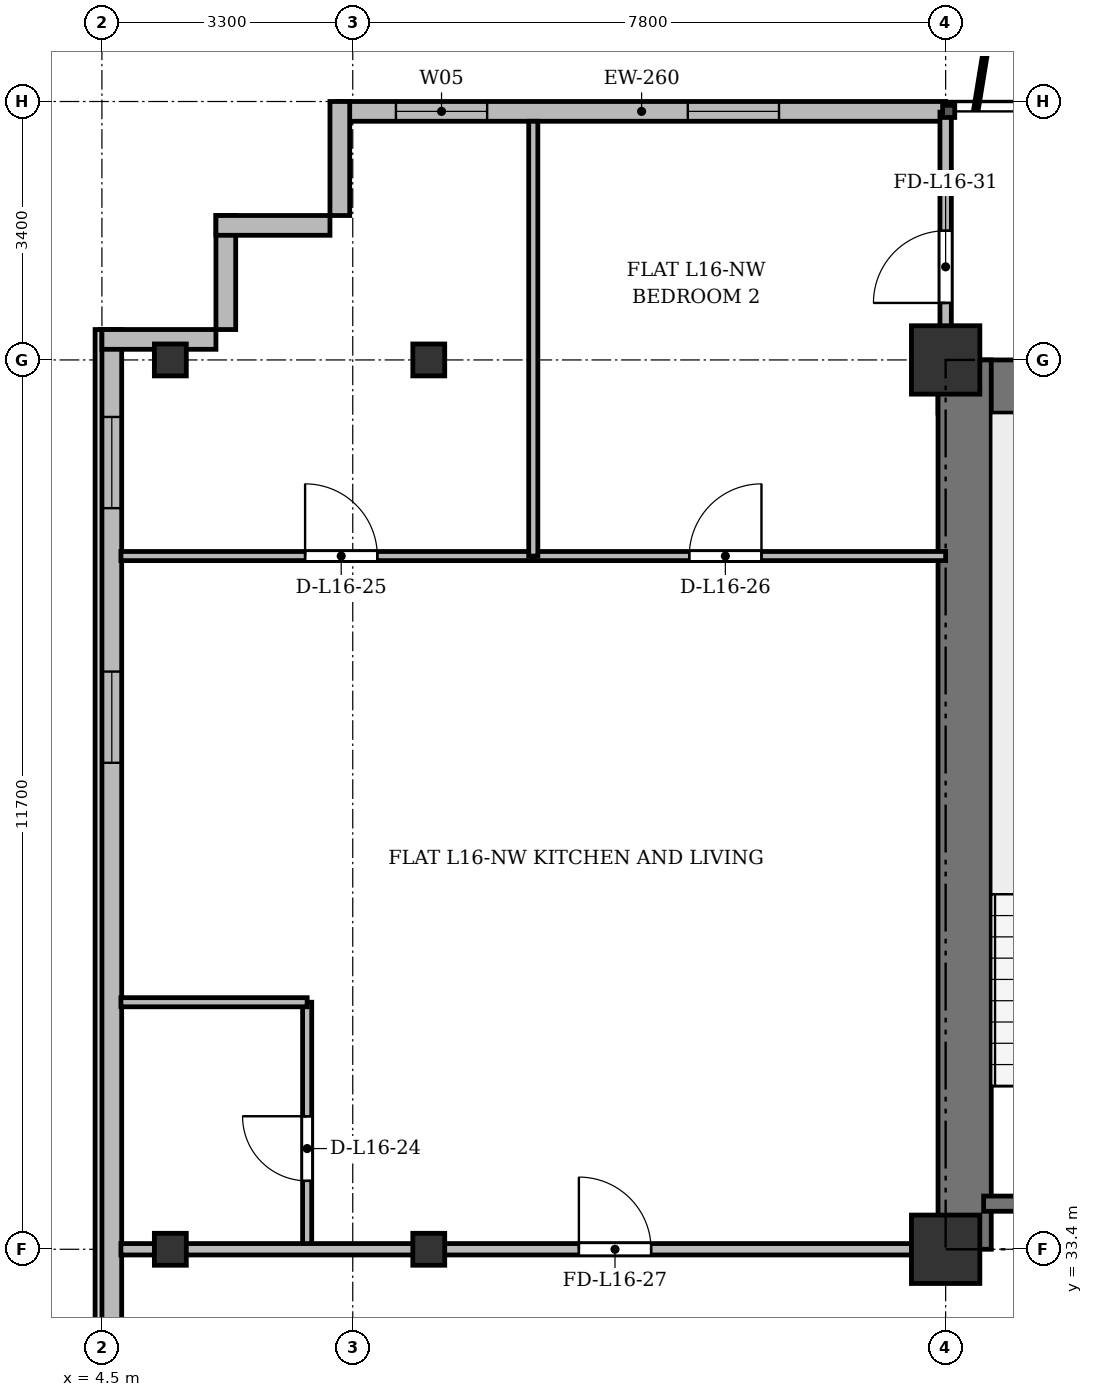
"""IFC4 building model, lengths in metres.
Left out: names, types, materials, properties, quantities, classifications, styles, units other than length and angle.
Written with IfcOpenShell. Run it as: python <this file> out.ifc"""

import sys

from ifc_helpers import new_model, si_unit, direction, frame, frame_2d, origin, origin_2d, place, context, subcontext, project, spatial, rectangle, i_section, extrude, source, transform, mapped, element, fill, save


model = new_model("IFC4")
c1 = context("Model", 3, precision=1e-05, world=origin(), true_north=direction((0.0, 1.0)))
c2 = subcontext(c1, "Body", "Model", "MODEL_VIEW")
j1 = project(units=[si_unit("LENGTHUNIT", "METRE"), si_unit("PLANEANGLEUNIT", "RADIAN")], contexts=[c1])
p1 = place(None, origin())
s1 = spatial("IfcSite", under=j1, at=p1, CompositionType="ELEMENT")
p2 = place(p1, origin())
s2 = spatial("IfcBuilding", under=s1, at=p2, CompositionType="ELEMENT")
p3 = place(p2, frame((0.0, 0.0, 63.1)))
s3 = spatial("IfcBuildingStorey", under=s2, at=p3, CompositionType="ELEMENT", Elevation=63.1)
m1 = source(origin(), c2, "Body", "SweptSolid", [
    extrude(i_section(OverallWidth=0.42, OverallDepth=0.42, WebThickness=0.026, FlangeThickness=0.04, at=origin_2d()), origin(), (0.0, 0.0, 1.0), 3.6),
])
for number, where, z_axis, x_axis in (
    (1, (5.4, 33.4, 0.0), (0.0, 0.0, 1.0), (1.0, 0.0, 0.0)),
    (2, (5.4, 45.1, 0.0), (0.0, 0.0, 1.0), (1.0, 0.0, 0.0)),
    (3, (8.8, 33.4, 0.0), (0.0, 0.0, 1.0), (1.0, 0.0, 0.0)),
    (4, (8.8, 45.1, 0.0), (0.0, 0.0, 1.0), (1.0, 0.0, 0.0)),
):
    element("IfcColumn", number, at=place(p3, frame(where, z_axis=z_axis, x_axis=x_axis)), inside=s3, PredefinedType="COLUMN", context=c2, shape_type="MappedRepresentation", body=[
        mapped(m1, transform((0.0, 0.0, 0.0), x_axis=(1.0, 0.0, 0.0), y_axis=(0.0, 1.0, 0.0), z_axis=(0.0, 0.0, 1.0), scale=1.0)),
    ])
m2 = source(origin(), c2, "Body", "SweptSolid", [
    extrude(rectangle(XDim=0.9, YDim=0.9, at=origin_2d()), origin(), (0.0, 0.0, 1.0), 3.6),
])
for number, where, z_axis, x_axis in (
    (5, (15.6, 33.4, 0.0), (0.0, 0.0, 1.0), (1.0, 0.0, 0.0)),
    (6, (15.6, 45.1, 0.0), (0.0, 0.0, 1.0), (1.0, 0.0, 0.0)),
):
    element("IfcColumn", number, at=place(p3, frame(where, z_axis=z_axis, x_axis=x_axis)), inside=s3, PredefinedType="COLUMN", context=c2, shape_type="MappedRepresentation", body=[
        mapped(m2, transform((0.0, 0.0, 0.0), x_axis=(1.0, 0.0, 0.0), y_axis=(0.0, 1.0, 0.0), z_axis=(0.0, 0.0, 1.0), scale=1.0)),
    ])
p4 = place(p3, frame((7.6, 48.37, 0.0), z_axis=(0.0, 0.0, 1.0), x_axis=(1.0, 0.0, 0.0)))
e7 = element("IfcWall", 7, at=p4, inside=s3, PredefinedType="SOLIDWALL", context=c2, shape_type="SweptSolid", body=[
    extrude(rectangle(XDim=8.0, YDim=0.26, at=frame_2d((4.0, 0.0))), origin(), (0.0, 0.0, 1.0), 3.34),
])
p5 = place(p4, frame((0.768, 0.0, 0.9)))
e8 = element("IfcOpeningElement", 8, at=p5, cuts=e7, PredefinedType="OPENING", context=c2, shape_type="SweptSolid", body=[
    extrude(rectangle(XDim=1.2, YDim=1.65, at=frame_2d((0.6, 0.825))), frame((0.0, 0.14, 0.0), z_axis=(0.0, -1.0, 0.0), x_axis=(1.0, 0.0, 0.0)), (0.0, 0.0, 1.0), 0.28),
])
p6 = place(p4, frame((4.608, 0.0, 0.9)))
e9 = element("IfcOpeningElement", 9, at=p6, cuts=e7, PredefinedType="OPENING", context=c2, shape_type="SweptSolid", body=[
    extrude(rectangle(XDim=1.2, YDim=1.65, at=frame_2d((0.6, 0.825))), frame((0.0, 0.14, 0.0), z_axis=(0.0, -1.0, 0.0), x_axis=(1.0, 0.0, 0.0)), (0.0, 0.0, 1.0), 0.28),
])
p7 = place(p3, frame((4.63, 5.9, 0.0), z_axis=(0.0, 0.0, 1.0), x_axis=(0.0, 1.0, 0.0)))
e10 = element("IfcWall", 10, at=p7, inside=s3, PredefinedType="SOLIDWALL", context=c2, shape_type="SweptSolid", body=[
    extrude(rectangle(XDim=39.6, YDim=0.26, at=frame_2d((19.8, 0.0))), origin(), (0.0, 0.0, 1.0), 3.34),
])
p8 = place(p7, frame((1.45, 0.0, 0.92)))
e11 = element("IfcOpeningElement", 11, at=p8, cuts=e10, PredefinedType="OPENING", context=c2, shape_type="SweptSolid", body=[
    extrude(rectangle(XDim=1.2, YDim=1.65, at=frame_2d((0.6, 0.825))), frame((0.0, 0.14, 0.0), z_axis=(0.0, -1.0, 0.0), x_axis=(1.0, 0.0, 0.0)), (0.0, 0.0, 1.0), 0.28),
])
p9 = place(p7, frame((4.2, 0.0, 0.92)))
e12 = element("IfcOpeningElement", 12, at=p9, cuts=e10, PredefinedType="OPENING", context=c2, shape_type="SweptSolid", body=[
    extrude(rectangle(XDim=2.6, YDim=1.9, at=frame_2d((1.3, 0.95))), frame((0.0, 0.14, 0.0), z_axis=(0.0, -1.0, 0.0), x_axis=(1.0, 0.0, 0.0)), (0.0, 0.0, 1.0), 0.28),
])
p10 = place(p7, frame((8.4, 0.0, 0.92)))
e13 = element("IfcOpeningElement", 13, at=p10, cuts=e10, PredefinedType="OPENING", context=c2, shape_type="SweptSolid", body=[
    extrude(rectangle(XDim=2.6, YDim=1.9, at=frame_2d((1.3, 0.95))), frame((0.0, 0.14, 0.0), z_axis=(0.0, -1.0, 0.0), x_axis=(1.0, 0.0, 0.0)), (0.0, 0.0, 1.0), 0.28),
])
p11 = place(p7, frame((33.9, 0.0, 0.92)))
e14 = element("IfcOpeningElement", 14, at=p11, cuts=e10, PredefinedType="OPENING", context=c2, shape_type="SweptSolid", body=[
    extrude(rectangle(XDim=1.2, YDim=1.65, at=frame_2d((0.6, 0.825))), frame((0.0, 0.14, 0.0), z_axis=(0.0, -1.0, 0.0), x_axis=(1.0, 0.0, 0.0)), (0.0, 0.0, 1.0), 0.28),
])
p12 = place(p7, frame((37.25, 0.0, 0.92)))
e15 = element("IfcOpeningElement", 15, at=p12, cuts=e10, PredefinedType="OPENING", context=c2, shape_type="SweptSolid", body=[
    extrude(rectangle(XDim=1.2, YDim=1.65, at=frame_2d((0.6, 0.825))), frame((0.0, 0.14, 0.0), z_axis=(0.0, -1.0, 0.0), x_axis=(1.0, 0.0, 0.0)), (0.0, 0.0, 1.0), 0.28),
])
p13 = place(p3, frame((4.5, 45.37, 0.0), z_axis=(0.0, 0.0, 1.0), x_axis=(1.0, 0.0, 0.0)))
e16 = element("IfcWall", 16, at=p13, inside=s3, PredefinedType="SOLIDWALL", context=c2, shape_type="SweptSolid", body=[
    extrude(rectangle(XDim=1.5, YDim=0.26, at=frame_2d((0.75, 0.0))), origin(), (0.0, 0.0, 1.0), 2.69),
])
for number, where, z_axis, x_axis in (
    (17, (6.13, 45.5, 0.0), (0.0, 0.0, 1.0), (0.0, 1.0, 0.0)),
    (18, (6.0, 46.87, 0.0), (0.0, 0.0, 1.0), (1.0, 0.0, 0.0)),
    (19, (7.63, 47.0, 0.0), (0.0, 0.0, 1.0), (0.0, 1.0, 0.0)),
):
    element("IfcWall", number, at=place(p3, frame(where, z_axis=z_axis, x_axis=x_axis)), inside=s3, PredefinedType="SOLIDWALL", context=c2, shape_type="SweptSolid", body=[
        extrude(rectangle(XDim=1.5, YDim=0.26, at=frame_2d((0.75, 0.0))), origin(), (0.0, 0.0, 1.0), 3.34),
    ])
p14 = place(p3, frame((15.5, 44.75, 0.0), z_axis=(0.0, 0.0, 1.0), x_axis=(1.0, 0.0, 0.0)))
e20 = element("IfcWall", 20, at=p14, inside=s3, PredefinedType="SHEAR", context=c2, shape_type="SweptSolid", body=[
    extrude(rectangle(XDim=43.4, YDim=0.7, at=frame_2d((21.7, 0.0))), origin(), (0.0, 0.0, 1.0), 3.34),
])
p15 = place(p3, frame((15.85, 33.4, 0.0), z_axis=(0.0, 0.0, 1.0), x_axis=(0.0, 1.0, 0.0)))
e21 = element("IfcWall", 21, at=p15, inside=s3, PredefinedType="SHEAR", context=c2, shape_type="SweptSolid", body=[
    extrude(rectangle(XDim=11.7, YDim=0.7, at=frame_2d((5.85, 0.0))), origin(), (0.0, 0.0, 1.0), 3.34),
])
p16 = place(p3, frame((16.1, 34.0, 0.0), z_axis=(0.0, 0.0, 1.0), x_axis=(1.0, 0.0, 0.0)))
e22 = element("IfcWall", 22, at=p16, inside=s3, PredefinedType="SHEAR", context=c2, shape_type="SweptSolid", body=[
    extrude(rectangle(XDim=3.4, YDim=0.2, at=frame_2d((1.7, 0.0))), origin(), (0.0, 0.0, 1.0), 3.34),
])
p17 = place(p3, frame((7.2, 33.4, 0.0), z_axis=(0.0, 0.0, 1.0), x_axis=(0.0, 1.0, 0.0)))
e23 = element("IfcWall", 23, at=p17, inside=s3, PredefinedType="PARTITIONING", context=c2, shape_type="SweptSolid", body=[
    extrude(rectangle(XDim=3.25, YDim=0.12, at=frame_2d((1.625, 0.0))), origin(), (0.0, 0.0, 1.0), 2.69),
])
p18 = place(p17, frame((0.9, 0.0, 0.0)))
e24 = element("IfcOpeningElement", 24, at=p18, cuts=e23, PredefinedType="OPENING", context=c2, shape_type="SweptSolid", body=[
    extrude(rectangle(XDim=0.85, YDim=2.1, at=frame_2d((0.425, 1.05))), frame((0.0, 0.07, 0.0), z_axis=(0.0, -1.0, 0.0), x_axis=(1.0, 0.0, 0.0)), (0.0, 0.0, 1.0), 0.14),
])
p19 = place(p3, frame((4.75, 36.65, 0.0), z_axis=(0.0, 0.0, 1.0), x_axis=(1.0, 0.0, 0.0)))
e25 = element("IfcWall", 25, at=p19, inside=s3, PredefinedType="PARTITIONING", context=c2, shape_type="SweptSolid", body=[
    extrude(rectangle(XDim=2.45, YDim=0.12, at=frame_2d((1.225, 0.0))), origin(), (0.0, 0.0, 1.0), 2.752),
])
p20 = place(p3, frame((4.75, 42.52, 0.0), z_axis=(0.0, 0.0, 1.0), x_axis=(1.0, 0.0, 0.0)))
e26 = element("IfcWall", 26, at=p20, inside=s3, PredefinedType="PARTITIONING", context=c2, shape_type="SweptSolid", body=[
    extrude(rectangle(XDim=5.425, YDim=0.12, at=frame_2d((2.712, 0.0))), origin(), (0.0, 0.0, 1.0), 2.752),
])
p21 = place(p20, frame((2.423, 0.0, 0.0)))
e27 = element("IfcOpeningElement", 27, at=p21, cuts=e26, PredefinedType="OPENING", context=c2, shape_type="SweptSolid", body=[
    extrude(rectangle(XDim=0.95, YDim=2.15, at=frame_2d((0.475, 1.075))), frame((0.0, 0.07, 0.0), z_axis=(0.0, -1.0, 0.0), x_axis=(1.0, 0.0, 0.0)), (0.0, 0.0, 1.0), 0.14),
])
p22 = place(p3, frame((10.175, 42.52, 0.0), z_axis=(0.0, 0.0, 1.0), x_axis=(1.0, 0.0, 0.0)))
e28 = element("IfcWall", 28, at=p22, inside=s3, PredefinedType="PARTITIONING", context=c2, shape_type="SweptSolid", body=[
    extrude(rectangle(XDim=5.425, YDim=0.12, at=frame_2d((2.712, 0.0))), origin(), (0.0, 0.0, 1.0), 2.752),
])
p23 = place(p22, frame((2.052, 0.0, 0.0)))
e29 = element("IfcOpeningElement", 29, at=p23, cuts=e28, PredefinedType="OPENING", context=c2, shape_type="SweptSolid", body=[
    extrude(rectangle(XDim=0.95, YDim=2.15, at=frame_2d((0.475, 1.075))), frame((0.0, 0.07, 0.0), z_axis=(0.0, -1.0, 0.0), x_axis=(1.0, 0.0, 0.0)), (0.0, 0.0, 1.0), 0.14),
])
p24 = place(p3, frame((10.175, 42.52, 0.0), z_axis=(0.0, 0.0, 1.0), x_axis=(0.0, 1.0, 0.0)))
e30 = element("IfcWall", 30, at=p24, inside=s3, PredefinedType="PARTITIONING", context=c2, shape_type="SweptSolid", body=[
    extrude(rectangle(XDim=5.72, YDim=0.12, at=frame_2d((2.86, 0.0))), origin(), (0.0, 0.0, 1.0), 2.69),
])
p25 = place(p3, frame((4.75, 33.4, 0.0), z_axis=(0.0, 0.0, 1.0), x_axis=(1.0, 0.0, 0.0)))
e31 = element("IfcWall", 31, at=p25, inside=s3, PredefinedType="PARTITIONING", context=c2, shape_type="SweptSolid", body=[
    extrude(rectangle(XDim=10.85, YDim=0.15, at=frame_2d((5.425, 0.0))), origin(), (0.0, 0.0, 1.0), 2.69),
])
p26 = place(p25, frame((6.025, 0.0, 0.0)))
e32 = element("IfcOpeningElement", 32, at=p26, cuts=e31, PredefinedType="OPENING", context=c2, shape_type="SweptSolid", body=[
    extrude(rectangle(XDim=0.95, YDim=2.15, at=frame_2d((0.475, 1.075))), frame((0.0, 0.085, 0.0), z_axis=(0.0, -1.0, 0.0), x_axis=(1.0, 0.0, 0.0)), (0.0, 0.0, 1.0), 0.17),
])
p27 = place(p3, frame((15.6, 44.75, 0.0), z_axis=(0.0, 0.0, 1.0), x_axis=(0.0, 1.0, 0.0)))
e33 = element("IfcWall", 33, at=p27, inside=s3, PredefinedType="PARTITIONING", context=c2, shape_type="SweptSolid", body=[
    extrude(rectangle(XDim=3.61, YDim=0.15, at=frame_2d((1.805, 0.0))), origin(), (0.0, 0.0, 1.0), 2.752),
])
p28 = place(p27, frame((1.1, 0.0, 0.0)))
e34 = element("IfcOpeningElement", 34, at=p28, cuts=e33, PredefinedType="OPENING", context=c2, shape_type="SweptSolid", body=[
    extrude(rectangle(XDim=0.95, YDim=2.15, at=frame_2d((0.475, 1.075))), frame((0.0, 0.085, 0.0), z_axis=(0.0, -1.0, 0.0), x_axis=(1.0, 0.0, 0.0)), (0.0, 0.0, 1.0), 0.17),
])
m3 = source(origin(), c2, "Body", "SweptSolid", [
    extrude(rectangle(XDim=1.2, YDim=1.65, at=frame_2d((0.6, 0.825))), frame((0.0, 0.03, 0.0), z_axis=(0.0, -1.0, 0.0), x_axis=(1.0, 0.0, 0.0)), (0.0, 0.0, 1.0), 0.06),
])
p29 = place(p5, origin())
e35 = element("IfcWindow", 35, at=p29, inside=s3, PartitioningType="SINGLE_PANEL", PredefinedType="WINDOW", context=c2, shape_type="MappedRepresentation", body=[
    mapped(m3, transform((0.0, 0.0, 0.0), x_axis=(1.0, 0.0, 0.0), y_axis=(0.0, 1.0, 0.0), z_axis=(0.0, 0.0, 1.0), scale=1.0)),
])
fill(e8, e35)
p30 = place(p6, origin())
e36 = element("IfcWindow", 36, at=p30, inside=s3, PartitioningType="SINGLE_PANEL", PredefinedType="WINDOW", context=c2, shape_type="MappedRepresentation", body=[
    mapped(m3, transform((0.0, 0.0, 0.0), x_axis=(1.0, 0.0, 0.0), y_axis=(0.0, 1.0, 0.0), z_axis=(0.0, 0.0, 1.0), scale=1.0)),
])
fill(e9, e36)
p31 = place(p11, origin())
e37 = element("IfcWindow", 37, at=p31, inside=s3, PartitioningType="SINGLE_PANEL", PredefinedType="WINDOW", context=c2, shape_type="MappedRepresentation", body=[
    mapped(m3, transform((0.0, 0.0, 0.0), x_axis=(1.0, 0.0, 0.0), y_axis=(0.0, 1.0, 0.0), z_axis=(0.0, 0.0, 1.0), scale=1.0)),
])
fill(e14, e37)
p32 = place(p12, origin())
e38 = element("IfcWindow", 38, at=p32, inside=s3, PartitioningType="SINGLE_PANEL", PredefinedType="WINDOW", context=c2, shape_type="MappedRepresentation", body=[
    mapped(m3, transform((0.0, 0.0, 0.0), x_axis=(1.0, 0.0, 0.0), y_axis=(0.0, 1.0, 0.0), z_axis=(0.0, 0.0, 1.0), scale=1.0)),
])
fill(e15, e38)
m4 = source(origin(), c2, "Body", "SweptSolid", [
    extrude(rectangle(XDim=0.85, YDim=2.1, at=frame_2d((0.425, 1.05))), frame((0.0, 0.025, 0.0), z_axis=(0.0, -1.0, 0.0), x_axis=(1.0, 0.0, 0.0)), (0.0, 0.0, 1.0), 0.05),
])
p33 = place(p18, origin())
e39 = element("IfcDoor", 39, at=p33, inside=s3, OperationType="SINGLE_SWING_RIGHT", PredefinedType="DOOR", context=c2, shape_type="MappedRepresentation", body=[
    mapped(m4, transform((0.0, 0.0, 0.0), x_axis=(1.0, 0.0, 0.0), y_axis=(0.0, 1.0, 0.0), z_axis=(0.0, 0.0, 1.0), scale=1.0)),
])
fill(e24, e39)
m5 = source(origin(), c2, "Body", "SweptSolid", [
    extrude(rectangle(XDim=0.95, YDim=2.15, at=frame_2d((0.475, 1.075))), frame((0.0, 0.025, 0.0), z_axis=(0.0, -1.0, 0.0), x_axis=(1.0, 0.0, 0.0)), (0.0, 0.0, 1.0), 0.05),
])
p34 = place(p21, origin())
e40 = element("IfcDoor", 40, at=p34, inside=s3, OperationType="SINGLE_SWING_LEFT", PredefinedType="DOOR", context=c2, shape_type="MappedRepresentation", body=[
    mapped(m5, transform((0.0, 0.0, 0.0), x_axis=(1.0, 0.0, 0.0), y_axis=(0.0, 1.0, 0.0), z_axis=(0.0, 0.0, 1.0), scale=1.0)),
])
fill(e27, e40)
p35 = place(p23, origin())
e41 = element("IfcDoor", 41, at=p35, inside=s3, OperationType="SINGLE_SWING_RIGHT", PredefinedType="DOOR", context=c2, shape_type="MappedRepresentation", body=[
    mapped(m5, transform((0.0, 0.0, 0.0), x_axis=(1.0, 0.0, 0.0), y_axis=(0.0, 1.0, 0.0), z_axis=(0.0, 0.0, 1.0), scale=1.0)),
])
fill(e29, e41)
p36 = place(p26, origin())
e42 = element("IfcDoor", 42, at=p36, inside=s3, OperationType="SINGLE_SWING_LEFT", PredefinedType="DOOR", context=c2, shape_type="MappedRepresentation", body=[
    mapped(m5, transform((0.0, 0.0, 0.0), x_axis=(1.0, 0.0, 0.0), y_axis=(0.0, 1.0, 0.0), z_axis=(0.0, 0.0, 1.0), scale=1.0)),
])
fill(e32, e42)
p37 = place(p28, origin())
e43 = element("IfcDoor", 43, at=p37, inside=s3, OperationType="SINGLE_SWING_LEFT", PredefinedType="DOOR", context=c2, shape_type="MappedRepresentation", body=[
    mapped(m5, transform((0.0, 0.0, 0.0), x_axis=(1.0, 0.0, 0.0), y_axis=(0.0, 1.0, 0.0), z_axis=(0.0, 0.0, 1.0), scale=1.0)),
])
fill(e34, e43)
save(model, sys.argv[1])
